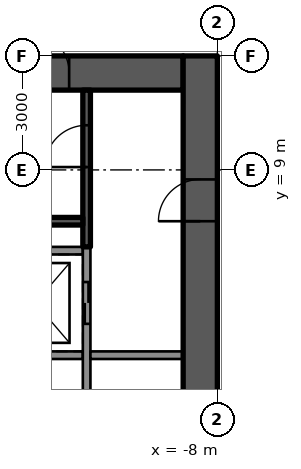
"""IFC4 building model, lengths in metres.
Left out: names, types, materials, properties, quantities, classifications, styles, units other than length and angle.
Written with IfcOpenShell. Run it as: python <this file> out.ifc"""

import sys

from ifc_helpers import new_model, si_unit, direction, frame, frame_2d, origin, place, context, subcontext, project, spatial, rectangle, extrude, element, fill, save


model = new_model("IFC4")
c1 = context("Model", 3, precision=1e-05, world=origin(), true_north=direction((0.0, 1.0)))
c2 = subcontext(c1, "Body", "Model", "MODEL_VIEW")
j1 = project(units=[si_unit("LENGTHUNIT", "METRE"), si_unit("PLANEANGLEUNIT", "RADIAN")], contexts=[c1])
p1 = place(None, origin())
s1 = spatial("IfcSite", under=j1, at=p1, CompositionType="ELEMENT")
p2 = place(p1, origin())
s2 = spatial("IfcBuilding", under=s1, at=p2, CompositionType="ELEMENT")
p3 = place(p2, frame((0.0, 0.0, 282.4)))
s3 = spatial("IfcBuildingStorey", under=s2, at=p3, CompositionType="ELEMENT", Elevation=282.4)
p4 = place(p3, frame((-18.1, 11.55, 0.0), z_axis=(0.0, 0.0, 1.0), x_axis=(1.0, 0.0, 0.0)))
e1 = element("IfcWall", 1, at=p4, inside=s3, PredefinedType="SHEAR", context=c2, shape_type="SweptSolid", body=[
    extrude(rectangle(XDim=9.2, YDim=0.9, at=frame_2d((4.6, 0.0))), origin(), (0.0, 0.0, 1.0), 3.5),
])
p5 = place(p4, frame((5.1, 0.0, 0.0)))
e2 = element("IfcOpeningElement", 2, at=p5, cuts=e1, PredefinedType="OPENING", context=c2, shape_type="SweptSolid", body=[
    extrude(rectangle(XDim=1.1, YDim=2.1, at=frame_2d((0.55, 1.05))), frame((0.0, 0.46, 0.0), z_axis=(0.0, -1.0, 0.0), x_axis=(1.0, 0.0, 0.0)), (0.0, 0.0, 1.0), 0.92),
])
p6 = place(p3, frame((-8.45, -12.0, 0.0), z_axis=(0.0, 0.0, 1.0), x_axis=(0.0, 1.0, 0.0)))
e3 = element("IfcWall", 3, at=p6, inside=s3, PredefinedType="SHEAR", context=c2, shape_type="SweptSolid", body=[
    extrude(rectangle(XDim=24.0, YDim=0.9, at=frame_2d((12.0, 0.0))), origin(), (0.0, 0.0, 1.0), 3.5),
])
p7 = place(p6, frame((9.6, 0.0, 0.0)))
e4 = element("IfcOpeningElement", 4, at=p7, cuts=e3, PredefinedType="OPENING", context=c2, shape_type="SweptSolid", body=[
    extrude(rectangle(XDim=1.8, YDim=2.1, at=frame_2d((0.9, 1.05))), frame((0.0, 0.46, 0.0), z_axis=(0.0, -1.0, 0.0), x_axis=(1.0, 0.0, 0.0)), (0.0, 0.0, 1.0), 0.92),
])
p8 = place(p6, frame((19.65, 0.0, 0.0)))
e5 = element("IfcOpeningElement", 5, at=p8, cuts=e3, PredefinedType="OPENING", context=c2, shape_type="SweptSolid", body=[
    extrude(rectangle(XDim=1.1, YDim=2.1, at=frame_2d((0.55, 1.05))), frame((0.0, 0.46, 0.0), z_axis=(0.0, -1.0, 0.0), x_axis=(1.0, 0.0, 0.0)), (0.0, 0.0, 1.0), 0.92),
])
p9 = place(p3, frame((-11.54, 6.875, 0.0), z_axis=(0.0, 0.0, 1.0), x_axis=(-1.0, 0.0, 0.0)))
e6 = element("IfcWall", 6, at=p9, inside=s3, PredefinedType="SOLIDWALL", context=c2, shape_type="SweptSolid", body=[
    extrude(rectangle(XDim=6.56, YDim=0.2, at=frame_2d((3.28, 0.0))), origin(), (0.0, 0.0, 1.0), 3.09),
])
p10 = place(p3, frame((-11.54, 4.125, 0.0), z_axis=(0.0, 0.0, 1.0), x_axis=(-1.0, 0.0, 0.0)))
e7 = element("IfcWall", 7, at=p10, inside=s3, PredefinedType="SOLIDWALL", context=c2, shape_type="SweptSolid", body=[
    extrude(rectangle(XDim=4.7, YDim=0.2, at=frame_2d((2.35, 0.0))), origin(), (0.0, 0.0, 1.0), 3.09),
])
p11 = place(p3, frame((-11.44, -6.975, 0.0), z_axis=(0.0, 0.0, 1.0), x_axis=(0.0, 1.0, 0.0)))
e8 = element("IfcWall", 8, at=p11, inside=s3, PredefinedType="SOLIDWALL", context=c2, shape_type="SweptSolid", body=[
    extrude(rectangle(XDim=13.95, YDim=0.2, at=frame_2d((6.975, 0.0))), origin(), (0.0, 0.0, 1.0), 3.09),
])
p12 = place(p11, frame((0.925, 0.0, 0.0)))
e9 = element("IfcOpeningElement", 9, at=p12, cuts=e8, PredefinedType="OPENING", context=c2, shape_type="SweptSolid", body=[
    extrude(rectangle(XDim=1.1, YDim=2.1, at=frame_2d((0.55, 1.05))), frame((0.0, 0.11, 0.0), z_axis=(0.0, -1.0, 0.0), x_axis=(1.0, 0.0, 0.0)), (0.0, 0.0, 1.0), 0.22),
])
p13 = place(p11, frame((3.675, 0.0, 0.0)))
e10 = element("IfcOpeningElement", 10, at=p13, cuts=e8, PredefinedType="OPENING", context=c2, shape_type="SweptSolid", body=[
    extrude(rectangle(XDim=1.1, YDim=2.1, at=frame_2d((0.55, 1.05))), frame((0.0, 0.11, 0.0), z_axis=(0.0, -1.0, 0.0), x_axis=(1.0, 0.0, 0.0)), (0.0, 0.0, 1.0), 0.22),
])
p14 = place(p11, frame((11.925, 0.0, 0.0)))
e11 = element("IfcOpeningElement", 11, at=p14, cuts=e8, PredefinedType="OPENING", context=c2, shape_type="SweptSolid", body=[
    extrude(rectangle(XDim=1.1, YDim=2.1, at=frame_2d((0.55, 1.05))), frame((0.0, 0.11, 0.0), z_axis=(0.0, -1.0, 0.0), x_axis=(1.0, 0.0, 0.0)), (0.0, 0.0, 1.0), 0.22),
])
p15 = place(p11, frame((6.575, 0.0, 0.0)))
e12 = element("IfcOpeningElement", 12, at=p15, cuts=e8, PredefinedType="OPENING", context=c2, shape_type="SweptSolid", body=[
    extrude(rectangle(XDim=0.8, YDim=2.1, at=frame_2d((0.4, 1.05))), frame((0.0, 0.11, 0.0), z_axis=(0.0, -1.0, 0.0), x_axis=(1.0, 0.0, 0.0)), (0.0, 0.0, 1.0), 0.22),
])
p16 = place(p3, frame((-11.44, 6.975, 0.0), z_axis=(0.0, 0.0, 1.0), x_axis=(0.0, 1.0, 0.0)))
e13 = element("IfcWall", 13, at=p16, inside=s3, PredefinedType="SOLIDWALL", context=c2, shape_type="SweptSolid", body=[
    extrude(rectangle(XDim=4.125, YDim=0.2, at=frame_2d((2.062, 0.0))), origin(), (0.0, 0.0, 1.0), 3.09),
])
p17 = place(p16, frame((2.1, 0.0, 0.0)))
e14 = element("IfcOpeningElement", 14, at=p17, cuts=e13, PredefinedType="OPENING", context=c2, shape_type="SweptSolid", body=[
    extrude(rectangle(XDim=1.1, YDim=2.1, at=frame_2d((0.55, 1.05))), frame((0.0, 0.11, 0.0), z_axis=(0.0, -1.0, 0.0), x_axis=(1.0, 0.0, 0.0)), (0.0, 0.0, 1.0), 0.22),
])
p18 = place(p3, frame((-11.54, 7.65, 0.0), z_axis=(0.0, 0.0, 1.0), x_axis=(-1.0, 0.0, 0.0)))
e15 = element("IfcWall", 15, at=p18, inside=s3, PredefinedType="SOLIDWALL", context=c2, shape_type="SweptSolid", body=[
    extrude(rectangle(XDim=6.56, YDim=0.2, at=frame_2d((3.28, 0.0))), origin(), (0.0, 0.0, 1.0), 3.09),
])
p19 = place(p3, frame((-8.9, 4.125, 0.0), z_axis=(0.0, 0.0, 1.0), x_axis=(-1.0, 0.0, 0.0)))
e16 = element("IfcWall", 16, at=p19, inside=s3, PredefinedType="PARTITIONING", context=c2, shape_type="SweptSolid", body=[
    extrude(rectangle(XDim=2.44, YDim=0.2, at=frame_2d((1.22, 0.0))), origin(), (0.0, 0.0, 1.0), 3.09),
])
p20 = place(p14, origin())
e17 = element("IfcDoor", 17, at=p20, inside=s3, OperationType="DOUBLE_DOOR_SLIDING", PredefinedType="DOOR", context=c2, shape_type="SweptSolid", body=[
    extrude(rectangle(XDim=1.1, YDim=2.1, at=frame_2d((0.55, 1.05))), frame((0.0, 0.025, 0.0), z_axis=(0.0, -1.0, 0.0), x_axis=(1.0, 0.0, 0.0)), (0.0, 0.0, 1.0), 0.05),
])
fill(e11, e17)
p21 = place(p8, origin())
e18 = element("IfcDoor", 18, at=p21, inside=s3, OperationType="SINGLE_SWING_RIGHT", PredefinedType="DOOR", context=c2, shape_type="SweptSolid", body=[
    extrude(rectangle(XDim=1.1, YDim=2.1, at=frame_2d((0.55, 1.05))), frame((0.0, 0.025, 0.0), z_axis=(0.0, -1.0, 0.0), x_axis=(1.0, 0.0, 0.0)), (0.0, 0.0, 1.0), 0.05),
])
fill(e5, e18)
p22 = place(p5, origin())
e19 = element("IfcDoor", 19, at=p22, inside=s3, OperationType="SINGLE_SWING_RIGHT", PredefinedType="DOOR", context=c2, shape_type="SweptSolid", body=[
    extrude(rectangle(XDim=1.1, YDim=2.1, at=frame_2d((0.55, 1.05))), frame((0.0, 0.025, 0.0), z_axis=(0.0, -1.0, 0.0), x_axis=(1.0, 0.0, 0.0)), (0.0, 0.0, 1.0), 0.05),
])
fill(e2, e19)
p23 = place(p17, origin())
e20 = element("IfcDoor", 20, at=p23, inside=s3, OperationType="SINGLE_SWING_RIGHT", PredefinedType="DOOR", context=c2, shape_type="SweptSolid", body=[
    extrude(rectangle(XDim=1.1, YDim=2.1, at=frame_2d((0.55, 1.05))), frame((0.0, 0.025, 0.0), z_axis=(0.0, -1.0, 0.0), x_axis=(1.0, 0.0, 0.0)), (0.0, 0.0, 1.0), 0.05),
])
fill(e14, e20)
save(model, sys.argv[1])
